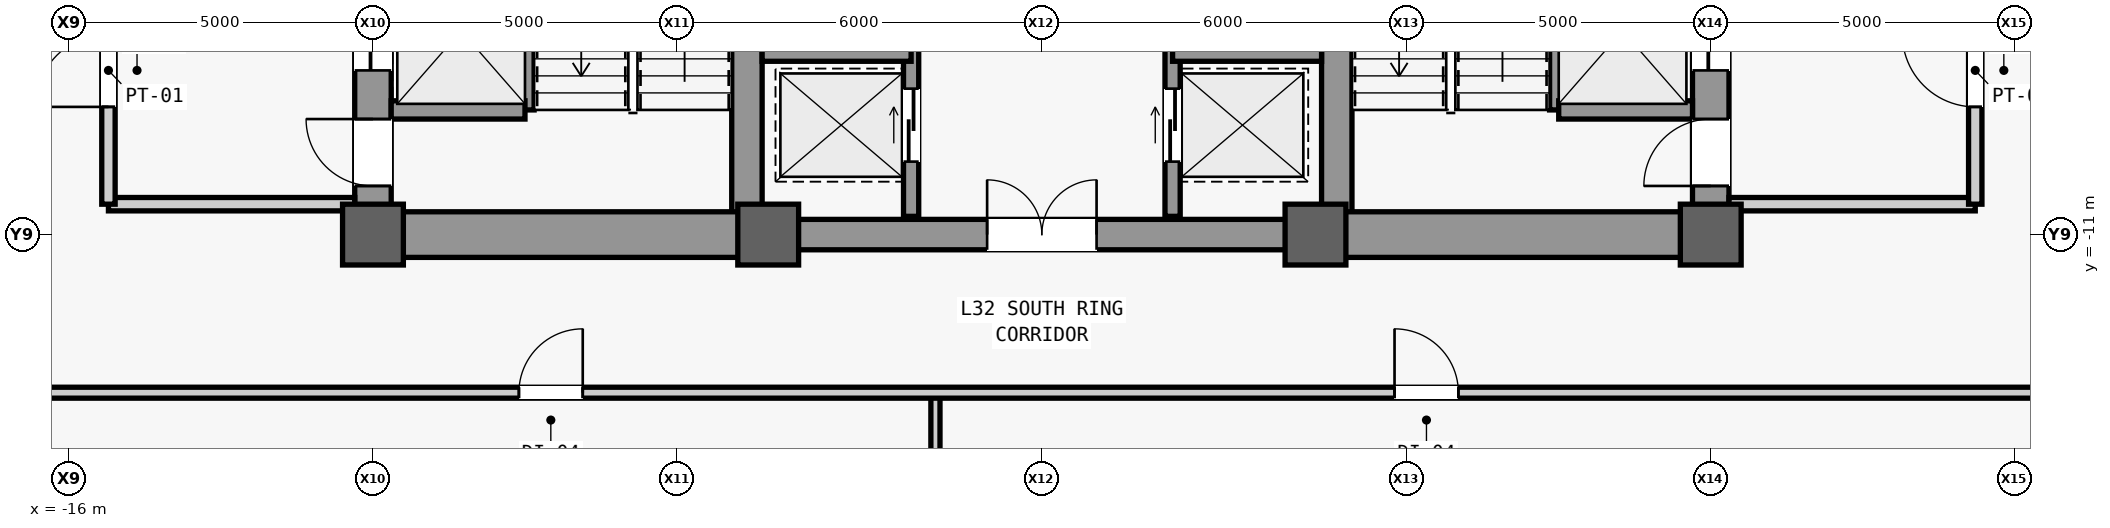
"""IFC4 building model, lengths in metres.
Left out: names, types, materials, properties, quantities, classifications, styles, units other than length and angle.
Written with IfcOpenShell. Run it as: python <this file> out.ifc"""

import sys

from ifc_helpers import new_model, si_unit, direction, frame, frame_2d, origin, origin_2d, place, context, subcontext, project, spatial, rectangle, extrude, source, transform, mapped, element, fill, save


model = new_model("IFC4")
c1 = context("Model", 3, precision=1e-05, world=origin(), true_north=direction((0.0, 1.0)))
c2 = subcontext(c1, "Body", "Model", "MODEL_VIEW")
j1 = project(units=[si_unit("LENGTHUNIT", "METRE"), si_unit("PLANEANGLEUNIT", "RADIAN")], contexts=[c1])
p1 = place(None, origin())
s1 = spatial("IfcSite", under=j1, at=p1, CompositionType="ELEMENT")
p2 = place(p1, origin())
s2 = spatial("IfcBuilding", under=s1, at=p2, CompositionType="ELEMENT")
p3 = place(p2, frame((0.0, 0.0, 140.6)))
s3 = spatial("IfcBuildingStorey", under=s2, at=p3, CompositionType="ELEMENT", Elevation=140.6)
m1 = source(origin(), c2, "Body", "SweptSolid", [
    extrude(rectangle(XDim=22.0, YDim=0.6, at=frame_2d((11.0, 0.0))), origin(), (0.0, 0.0, 1.0), 3.84),
])
p4 = place(p3, frame((-11.0, -11.0, 0.0), z_axis=(0.0, 0.0, 1.0), x_axis=(0.0, 1.0, 0.0)))
e1 = element("IfcWall", 1, at=p4, inside=s3, PredefinedType="SHEAR", context=c2, shape_type="MappedRepresentation", body=[
    mapped(m1, transform((0.0, 0.0, 0.0), scale=1.0)),
])
m2 = source(origin(), c2, "Body", "SweptSolid", [
    extrude(rectangle(XDim=1.1, YDim=2.2, at=frame_2d((0.55, 1.1))), frame((0.0, 0.31, 0.0), z_axis=(0.0, -1.0, 0.0), x_axis=(1.0, 0.0, 0.0)), (0.0, 0.0, 1.0), 0.62),
])
p5 = place(p4, frame((0.8, 0.0, 0.0)))
e2 = element("IfcOpeningElement", 2, at=p5, cuts=e1, PredefinedType="OPENING", context=c2, shape_type="MappedRepresentation", body=[
    mapped(m2, transform((0.0, 0.0, 0.0), scale=1.0)),
])
p6 = place(p4, frame((12.5, 0.0, 0.0)))
e3 = element("IfcOpeningElement", 3, at=p6, cuts=e1, PredefinedType="OPENING", context=c2, shape_type="MappedRepresentation", body=[
    mapped(m2, transform((0.0, 0.0, 0.0), scale=1.0)),
])
m3 = source(origin(), c2, "Body", "SweptSolid", [
    extrude(rectangle(XDim=0.9, YDim=2.15, at=frame_2d((0.45, 1.075))), frame((0.0, 0.31, 0.0), z_axis=(0.0, -1.0, 0.0), x_axis=(1.0, 0.0, 0.0)), (0.0, 0.0, 1.0), 0.62),
])
p7 = place(p4, frame((6.2, 0.0, 0.0)))
e4 = element("IfcOpeningElement", 4, at=p7, cuts=e1, PredefinedType="OPENING", context=c2, shape_type="MappedRepresentation", body=[
    mapped(m3, transform((0.0, 0.0, 0.0), scale=1.0)),
])
p8 = place(p4, frame((8.05, 0.0, 0.0)))
e5 = element("IfcOpeningElement", 5, at=p8, cuts=e1, PredefinedType="OPENING", context=c2, shape_type="MappedRepresentation", body=[
    mapped(m3, transform((0.0, 0.0, 0.0), scale=1.0)),
])
m4 = source(origin(), c2, "Body", "SweptSolid", [
    extrude(rectangle(XDim=1.3, YDim=2.3, at=frame_2d((0.65, 1.15))), frame((0.0, 0.31, 0.0), z_axis=(0.0, -1.0, 0.0), x_axis=(1.0, 0.0, 0.0)), (0.0, 0.0, 1.0), 0.62),
])
p9 = place(p4, frame((2.7, 0.0, 0.0)))
e6 = element("IfcOpeningElement", 6, at=p9, cuts=e1, PredefinedType="OPENING", context=c2, shape_type="MappedRepresentation", body=[
    mapped(m4, transform((0.0, 0.0, 0.0), scale=1.0)),
])
p10 = place(p3, frame((11.0, -11.0, 0.0), z_axis=(0.0, 0.0, 1.0), x_axis=(0.0, 1.0, 0.0)))
e7 = element("IfcWall", 7, at=p10, inside=s3, PredefinedType="SHEAR", context=c2, shape_type="MappedRepresentation", body=[
    mapped(m1, transform((0.0, 0.0, 0.0), scale=1.0)),
])
p11 = place(p10, frame((0.8, 0.0, 0.0)))
e8 = element("IfcOpeningElement", 8, at=p11, cuts=e7, PredefinedType="OPENING", context=c2, shape_type="MappedRepresentation", body=[
    mapped(m2, transform((0.0, 0.0, 0.0), scale=1.0)),
])
p12 = place(p10, frame((6.85, 0.0, 0.0)))
e9 = element("IfcOpeningElement", 9, at=p12, cuts=e7, PredefinedType="OPENING", context=c2, shape_type="MappedRepresentation", body=[
    mapped(m3, transform((0.0, 0.0, 0.0), scale=1.0)),
])
p13 = place(p10, frame((2.7, 0.0, 0.0)))
e10 = element("IfcOpeningElement", 10, at=p13, cuts=e7, PredefinedType="OPENING", context=c2, shape_type="MappedRepresentation", body=[
    mapped(m4, transform((0.0, 0.0, 0.0), scale=1.0)),
])
p14 = place(p10, frame((13.35, 0.0, 0.0)))
e11 = element("IfcOpeningElement", 11, at=p14, cuts=e7, PredefinedType="OPENING", context=c2, shape_type="MappedRepresentation", body=[
    mapped(m4, transform((0.0, 0.0, 0.0), scale=1.0)),
])
m5 = source(origin(), c2, "Body", "SweptSolid", [
    extrude(rectangle(XDim=21.4, YDim=0.5, at=frame_2d((10.7, 0.0))), origin(), (0.0, 0.0, 1.0), 3.84),
])
for number, where, z_axis, x_axis in (
    (12, (-4.85, -10.7, 0.0), (0.0, 0.0, 1.0), (0.0, 1.0, 0.0)),
    (13, (4.85, -10.7, 0.0), (0.0, 0.0, 1.0), (0.0, 1.0, 0.0)),
):
    element("IfcWall", number, at=place(p3, frame(where, z_axis=z_axis, x_axis=x_axis)), inside=s3, PredefinedType="SHEAR", context=c2, shape_type="MappedRepresentation", body=[
        mapped(m5, transform((0.0, 0.0, 0.0), scale=1.0)),
    ])
m6 = source(origin(), c2, "Body", "SweptSolid", [
    extrude(rectangle(XDim=5.85, YDim=0.75, at=frame_2d((2.925, 0.0))), origin(), (0.0, 0.0, 1.0), 3.84),
])
for number, where, z_axis, x_axis in (
    (14, (-10.7, -11.0, 0.0), (0.0, 0.0, 1.0), (1.0, 0.0, 0.0)),
    (15, (4.85, -11.0, 0.0), (0.0, 0.0, 1.0), (1.0, 0.0, 0.0)),
):
    element("IfcWall", number, at=place(p3, frame(where, z_axis=z_axis, x_axis=x_axis)), inside=s3, PredefinedType="SHEAR", context=c2, shape_type="MappedRepresentation", body=[
        mapped(m6, transform((0.0, 0.0, 0.0), scale=1.0)),
    ])
m7 = source(origin(), c2, "Body", "SweptSolid", [
    extrude(rectangle(XDim=9.2, YDim=0.5, at=frame_2d((4.6, 0.0))), origin(), (0.0, 0.0, 1.0), 3.84),
])
p15 = place(p3, frame((-4.6, -11.0, 0.0), z_axis=(0.0, 0.0, 1.0), x_axis=(1.0, 0.0, 0.0)))
e16 = element("IfcWall", 16, at=p15, inside=s3, PredefinedType="SHEAR", context=c2, shape_type="MappedRepresentation", body=[
    mapped(m7, transform((0.0, 0.0, 0.0), scale=1.0)),
])
m8 = source(origin(), c2, "Body", "SweptSolid", [
    extrude(rectangle(XDim=1.8, YDim=2.25, at=frame_2d((0.9, 1.125))), frame((0.0, 0.26, 0.0), z_axis=(0.0, -1.0, 0.0), x_axis=(1.0, 0.0, 0.0)), (0.0, 0.0, 1.0), 0.52),
])
p16 = place(p15, frame((3.7, 0.0, 0.0)))
e17 = element("IfcOpeningElement", 17, at=p16, cuts=e16, PredefinedType="OPENING", context=c2, shape_type="MappedRepresentation", body=[
    mapped(m8, transform((0.0, 0.0, 0.0), scale=1.0)),
])
m9 = source(origin(), c2, "Body", "SweptSolid", [
    extrude(rectangle(XDim=1.0, YDim=1.0, at=origin_2d()), origin(), (0.0, 0.0, 1.0), 4.1),
])
for number, where, z_axis, x_axis in (
    (18, (-11.0, -11.0, 0.0), (0.0, 0.0, 1.0), (1.0, 0.0, 0.0)),
    (19, (-4.5, -11.0, 0.0), (0.0, 0.0, 1.0), (1.0, 0.0, 0.0)),
    (20, (4.5, -11.0, 0.0), (0.0, 0.0, 1.0), (1.0, 0.0, 0.0)),
    (21, (11.0, -11.0, 0.0), (0.0, 0.0, 1.0), (1.0, 0.0, 0.0)),
):
    element("IfcColumn", number, at=place(p3, frame(where, z_axis=z_axis, x_axis=x_axis)), inside=s3, PredefinedType="COLUMN", context=c2, shape_type="MappedRepresentation", body=[
        mapped(m9, transform((0.0, 0.0, 0.0), scale=1.0)),
    ])
m10 = source(origin(), c2, "Body", "SweptSolid", [
    extrude(rectangle(XDim=7.8, YDim=0.3, at=frame_2d((3.9, 0.0))), origin(), (0.0, 0.0, 1.0), 3.84),
])
p17 = place(p3, frame((-8.5, -8.95, 0.0), z_axis=(0.0, 0.0, 1.0), x_axis=(0.0, 1.0, 0.0)))
e22 = element("IfcWall", 22, at=p17, inside=s3, PredefinedType="SHEAR", context=c2, shape_type="MappedRepresentation", body=[
    mapped(m10, transform((0.0, 0.0, 0.0), scale=1.0)),
])
m11 = source(origin(), c2, "Body", "SweptSolid", [
    extrude(rectangle(XDim=2.2, YDim=0.3, at=frame_2d((1.1, 0.0))), origin(), (0.0, 0.0, 1.0), 3.84),
])
p18 = place(p3, frame((-10.7, -8.95, 0.0), z_axis=(0.0, 0.0, 1.0), x_axis=(1.0, 0.0, 0.0)))
e23 = element("IfcWall", 23, at=p18, inside=s3, PredefinedType="SHEAR", context=c2, shape_type="MappedRepresentation", body=[
    mapped(m11, transform((0.0, 0.0, 0.0), scale=1.0)),
])
p19 = place(p3, frame((8.5, -8.95, 0.0), z_axis=(0.0, 0.0, 1.0), x_axis=(0.0, 1.0, 0.0)))
e24 = element("IfcWall", 24, at=p19, inside=s3, PredefinedType="SHEAR", context=c2, shape_type="MappedRepresentation", body=[
    mapped(m10, transform((0.0, 0.0, 0.0), scale=1.0)),
])
p20 = place(p3, frame((8.5, -8.95, 0.0), z_axis=(0.0, 0.0, 1.0), x_axis=(1.0, 0.0, 0.0)))
e25 = element("IfcWall", 25, at=p20, inside=s3, PredefinedType="SHEAR", context=c2, shape_type="MappedRepresentation", body=[
    mapped(m11, transform((0.0, 0.0, 0.0), scale=1.0)),
])
m12 = source(origin(), c2, "Body", "SweptSolid", [
    extrude(rectangle(XDim=4.05, YDim=0.22, at=frame_2d((2.025, 0.0))), origin(), (0.0, 0.0, 1.0), 3.84),
])
p21 = place(p3, frame((-15.35, -10.5, 0.0), z_axis=(0.0, 0.0, 1.0), x_axis=(1.0, 0.0, 0.0)))
e26 = element("IfcWall", 26, at=p21, inside=s3, PredefinedType="PARTITIONING", context=c2, shape_type="MappedRepresentation", body=[
    mapped(m12, transform((0.0, 0.0, 0.0), scale=1.0)),
])
m13 = source(origin(), c2, "Body", "SweptSolid", [
    extrude(rectangle(XDim=4.4, YDim=0.22, at=frame_2d((2.2, 0.0))), origin(), (0.0, 0.0, 1.0), 3.84),
])
p22 = place(p3, frame((-15.35, -10.5, 0.0), z_axis=(0.0, 0.0, 1.0), x_axis=(0.0, 1.0, 0.0)))
e27 = element("IfcWall", 27, at=p22, inside=s3, PredefinedType="PARTITIONING", context=c2, shape_type="MappedRepresentation", body=[
    mapped(m13, transform((0.0, 0.0, 0.0), scale=1.0)),
])
m14 = source(origin(), c2, "Body", "SweptSolid", [
    extrude(rectangle(XDim=1.2, YDim=2.2, at=frame_2d((0.6, 1.1))), frame((0.0, 0.12, 0.0), z_axis=(0.0, -1.0, 0.0), x_axis=(1.0, 0.0, 0.0)), (0.0, 0.0, 1.0), 0.24),
])
p23 = place(p22, frame((1.6, 0.0, 0.0)))
e28 = element("IfcOpeningElement", 28, at=p23, cuts=e27, PredefinedType="OPENING", context=c2, shape_type="MappedRepresentation", body=[
    mapped(m14, transform((0.0, 0.0, 0.0), scale=1.0)),
])
p24 = place(p3, frame((11.3, -10.5, 0.0), z_axis=(0.0, 0.0, 1.0), x_axis=(1.0, 0.0, 0.0)))
e29 = element("IfcWall", 29, at=p24, inside=s3, PredefinedType="PARTITIONING", context=c2, shape_type="MappedRepresentation", body=[
    mapped(m12, transform((0.0, 0.0, 0.0), scale=1.0)),
])
p25 = place(p3, frame((15.35, -10.5, 0.0), z_axis=(0.0, 0.0, 1.0), x_axis=(0.0, 1.0, 0.0)))
e30 = element("IfcWall", 30, at=p25, inside=s3, PredefinedType="PARTITIONING", context=c2, shape_type="MappedRepresentation", body=[
    mapped(m13, transform((0.0, 0.0, 0.0), scale=1.0)),
])
p26 = place(p25, frame((1.6, 0.0, 0.0)))
e31 = element("IfcOpeningElement", 31, at=p26, cuts=e30, PredefinedType="OPENING", context=c2, shape_type="MappedRepresentation", body=[
    mapped(m14, transform((0.0, 0.0, 0.0), scale=1.0)),
])
m15 = source(origin(), c2, "Body", "SweptSolid", [
    extrude(rectangle(XDim=5.4, YDim=0.25, at=frame_2d((2.7, 0.0))), origin(), (0.0, 0.0, 1.0), 3.84),
])
p27 = place(p3, frame((-2.15, -10.7, 0.0), z_axis=(0.0, 0.0, 1.0), x_axis=(0.0, 1.0, 0.0)))
e32 = element("IfcWall", 32, at=p27, inside=s3, PredefinedType="SHEAR", context=c2, shape_type="MappedRepresentation", body=[
    mapped(m15, transform((0.0, 0.0, 0.0), scale=1.0)),
])
m16 = source(origin(), c2, "Body", "SweptSolid", [
    extrude(rectangle(XDim=1.2, YDim=2.3, at=frame_2d((0.6, 1.15))), frame((0.0, 0.135, 0.0), z_axis=(0.0, -1.0, 0.0), x_axis=(1.0, 0.0, 0.0)), (0.0, 0.0, 1.0), 0.27),
])
p28 = place(p27, frame((0.9, 0.0, 0.0)))
e33 = element("IfcOpeningElement", 33, at=p28, cuts=e32, PredefinedType="OPENING", context=c2, shape_type="MappedRepresentation", body=[
    mapped(m16, transform((0.0, 0.0, 0.0), scale=1.0)),
])
p29 = place(p27, frame((3.2, 0.0, 0.0)))
e34 = element("IfcOpeningElement", 34, at=p29, cuts=e32, PredefinedType="OPENING", context=c2, shape_type="MappedRepresentation", body=[
    mapped(m16, transform((0.0, 0.0, 0.0), scale=1.0)),
])
p30 = place(p3, frame((2.15, -10.7, 0.0), z_axis=(0.0, 0.0, 1.0), x_axis=(0.0, 1.0, 0.0)))
e35 = element("IfcWall", 35, at=p30, inside=s3, PredefinedType="SHEAR", context=c2, shape_type="MappedRepresentation", body=[
    mapped(m15, transform((0.0, 0.0, 0.0), scale=1.0)),
])
p31 = place(p30, frame((0.9, 0.0, 0.0)))
e36 = element("IfcOpeningElement", 36, at=p31, cuts=e35, PredefinedType="OPENING", context=c2, shape_type="MappedRepresentation", body=[
    mapped(m16, transform((0.0, 0.0, 0.0), scale=1.0)),
])
p32 = place(p30, frame((3.2, 0.0, 0.0)))
e37 = element("IfcOpeningElement", 37, at=p32, cuts=e35, PredefinedType="OPENING", context=c2, shape_type="MappedRepresentation", body=[
    mapped(m16, transform((0.0, 0.0, 0.0), scale=1.0)),
])
m17 = source(origin(), c2, "Body", "SweptSolid", [
    extrude(rectangle(XDim=2.45, YDim=0.2, at=frame_2d((1.225, 0.0))), origin(), (0.0, 0.0, 1.0), 3.84),
])
for number, where, z_axis, x_axis in (
    (38, (-4.6, -8.05, 0.0), (0.0, 0.0, 1.0), (1.0, 0.0, 0.0)),
    (39, (2.15, -8.05, 0.0), (0.0, 0.0, 1.0), (1.0, 0.0, 0.0)),
):
    element("IfcWall", number, at=place(p3, frame(where, z_axis=z_axis, x_axis=x_axis)), inside=s3, PredefinedType="SHEAR", context=c2, shape_type="MappedRepresentation", body=[
        mapped(m17, transform((0.0, 0.0, 0.0), scale=1.0)),
    ])
m18 = source(origin(), c2, "Body", "SweptSolid", [
    extrude(rectangle(XDim=18.4, YDim=0.15, at=frame_2d((9.2, 0.0))), origin(), (0.0, 0.0, 1.0), 3.84),
])
p33 = place(p3, frame((-1.75, -32.0, 0.0), z_axis=(0.0, 0.0, 1.0), x_axis=(0.0, 1.0, 0.0)))
e40 = element("IfcWall", 40, at=p33, inside=s3, PredefinedType="PARTITIONING", context=c2, shape_type="MappedRepresentation", body=[
    mapped(m18, transform((0.0, 0.0, 0.0), scale=1.0)),
])
m19 = source(origin(), c2, "Body", "SweptSolid", [
    extrude(rectangle(XDim=36.25, YDim=0.18, at=frame_2d((18.125, 0.0))), origin(), (0.0, 0.0, 1.0), 3.84),
])
p34 = place(p3, frame((-17.7, -13.6, 0.0), z_axis=(0.0, 0.0, 1.0), x_axis=(1.0, 0.0, 0.0)))
e41 = element("IfcWall", 41, at=p34, inside=s3, PredefinedType="PARTITIONING", context=c2, shape_type="MappedRepresentation", body=[
    mapped(m19, transform((0.0, 0.0, 0.0), scale=1.0)),
])
m20 = source(origin(), c2, "Body", "SweptSolid", [
    extrude(rectangle(XDim=1.05, YDim=2.2, at=frame_2d((0.525, 1.1))), frame((0.0, 0.1, 0.0), z_axis=(0.0, -1.0, 0.0), x_axis=(1.0, 0.0, 0.0)), (0.0, 0.0, 1.0), 0.2),
])
p35 = place(p34, frame((9.1, 0.0, 0.0)))
e42 = element("IfcOpeningElement", 42, at=p35, cuts=e41, PredefinedType="OPENING", context=c2, shape_type="MappedRepresentation", body=[
    mapped(m20, transform((0.0, 0.0, 0.0), scale=1.0)),
])
p36 = place(p34, frame((23.5, 0.0, 0.0)))
e43 = element("IfcOpeningElement", 43, at=p36, cuts=e41, PredefinedType="OPENING", context=c2, shape_type="MappedRepresentation", body=[
    mapped(m20, transform((0.0, 0.0, 0.0), scale=1.0)),
])
m21 = source(origin(), c2, "Body", "SweptSolid", [
    extrude(rectangle(XDim=1.1, YDim=2.2, at=frame_2d((0.55, 1.1))), frame((0.0, 0.025, 0.0), z_axis=(0.0, -1.0, 0.0), x_axis=(1.0, 0.0, 0.0)), (0.0, 0.0, 1.0), 0.05),
])
p37 = place(p5, origin())
e44 = element("IfcDoor", 44, at=p37, inside=s3, OperationType="SINGLE_SWING_RIGHT", PredefinedType="DOOR", context=c2, shape_type="MappedRepresentation", body=[
    mapped(m21, transform((0.0, 0.0, 0.0), scale=1.0)),
])
fill(e2, e44)
p38 = place(p11, origin())
e45 = element("IfcDoor", 45, at=p38, inside=s3, OperationType="SINGLE_SWING_LEFT", PredefinedType="DOOR", context=c2, shape_type="MappedRepresentation", body=[
    mapped(m21, transform((0.0, 0.0, 0.0), scale=1.0)),
])
fill(e8, e45)
m22 = source(origin(), c2, "Body", "SweptSolid", [
    extrude(rectangle(XDim=1.2, YDim=2.2, at=frame_2d((0.6, 1.1))), frame((0.0, 0.025, 0.0), z_axis=(0.0, -1.0, 0.0), x_axis=(1.0, 0.0, 0.0)), (0.0, 0.0, 1.0), 0.05),
])
p39 = place(p23, origin())
e46 = element("IfcDoor", 46, at=p39, inside=s3, OperationType="SINGLE_SWING_LEFT", PredefinedType="DOOR", context=c2, shape_type="MappedRepresentation", body=[
    mapped(m22, transform((0.0, 0.0, 0.0), scale=1.0)),
])
fill(e28, e46)
p40 = place(p26, origin())
e47 = element("IfcDoor", 47, at=p40, inside=s3, OperationType="SINGLE_SWING_RIGHT", PredefinedType="DOOR", context=c2, shape_type="MappedRepresentation", body=[
    mapped(m22, transform((0.0, 0.0, 0.0), scale=1.0)),
])
fill(e31, e47)
m23 = source(origin(), c2, "Body", "SweptSolid", [
    extrude(rectangle(XDim=1.8, YDim=2.25, at=frame_2d((0.9, 1.125))), frame((0.0, 0.025, 0.0), z_axis=(0.0, -1.0, 0.0), x_axis=(1.0, 0.0, 0.0)), (0.0, 0.0, 1.0), 0.05),
])
p41 = place(p16, origin())
e48 = element("IfcDoor", 48, at=p41, inside=s3, OperationType="SINGLE_SWING_LEFT", PredefinedType="DOOR", context=c2, shape_type="MappedRepresentation", body=[
    mapped(m23, transform((0.0, 0.0, 0.0), scale=1.0)),
])
fill(e17, e48)
m24 = source(origin(), c2, "Body", "SweptSolid", [
    extrude(rectangle(XDim=1.05, YDim=2.2, at=frame_2d((0.525, 1.1))), frame((0.0, 0.025, 0.0), z_axis=(0.0, -1.0, 0.0), x_axis=(1.0, 0.0, 0.0)), (0.0, 0.0, 1.0), 0.05),
])
p42 = place(p35, origin())
e49 = element("IfcDoor", 49, at=p42, inside=s3, OperationType="SINGLE_SWING_RIGHT", PredefinedType="DOOR", context=c2, shape_type="MappedRepresentation", body=[
    mapped(m24, transform((0.0, 0.0, 0.0), scale=1.0)),
])
fill(e42, e49)
p43 = place(p36, origin())
e50 = element("IfcDoor", 50, at=p43, inside=s3, OperationType="SINGLE_SWING_LEFT", PredefinedType="DOOR", context=c2, shape_type="MappedRepresentation", body=[
    mapped(m24, transform((0.0, 0.0, 0.0), scale=1.0)),
])
fill(e43, e50)
m25 = source(origin(), c2, "Body", "SweptSolid", [
    extrude(rectangle(XDim=1.2, YDim=2.3, at=frame_2d((0.6, 1.15))), frame((0.0, 0.025, 0.0), z_axis=(0.0, -1.0, 0.0), x_axis=(1.0, 0.0, 0.0)), (0.0, 0.0, 1.0), 0.05),
])
p44 = place(p28, origin())
e51 = element("IfcDoor", 51, at=p44, inside=s3, OperationType="SLIDING_TO_LEFT", PredefinedType="DOOR", context=c2, shape_type="MappedRepresentation", body=[
    mapped(m25, transform((0.0, 0.0, 0.0), scale=1.0)),
])
fill(e33, e51)
p45 = place(p31, origin())
e52 = element("IfcDoor", 52, at=p45, inside=s3, OperationType="SLIDING_TO_LEFT", PredefinedType="DOOR", context=c2, shape_type="MappedRepresentation", body=[
    mapped(m25, transform((0.0, 0.0, 0.0), scale=1.0)),
])
fill(e36, e52)
m26 = source(origin(), c2, "Body", "SweptSolid", [
    extrude(rectangle(XDim=1.3, YDim=2.3, at=frame_2d((0.65, 1.15))), frame((0.0, 0.025, 0.0), z_axis=(0.0, -1.0, 0.0), x_axis=(1.0, 0.0, 0.0)), (0.0, 0.0, 1.0), 0.05),
])
p46 = place(p9, origin())
e53 = element("IfcDoor", 53, at=p46, inside=s3, OperationType="SLIDING_TO_LEFT", PredefinedType="DOOR", context=c2, shape_type="MappedRepresentation", body=[
    mapped(m26, transform((0.0, 0.0, 0.0), scale=1.0)),
])
fill(e6, e53)
p47 = place(p13, origin())
e54 = element("IfcDoor", 54, at=p47, inside=s3, OperationType="SLIDING_TO_LEFT", PredefinedType="DOOR", context=c2, shape_type="MappedRepresentation", body=[
    mapped(m26, transform((0.0, 0.0, 0.0), scale=1.0)),
])
fill(e10, e54)
save(model, sys.argv[1])
